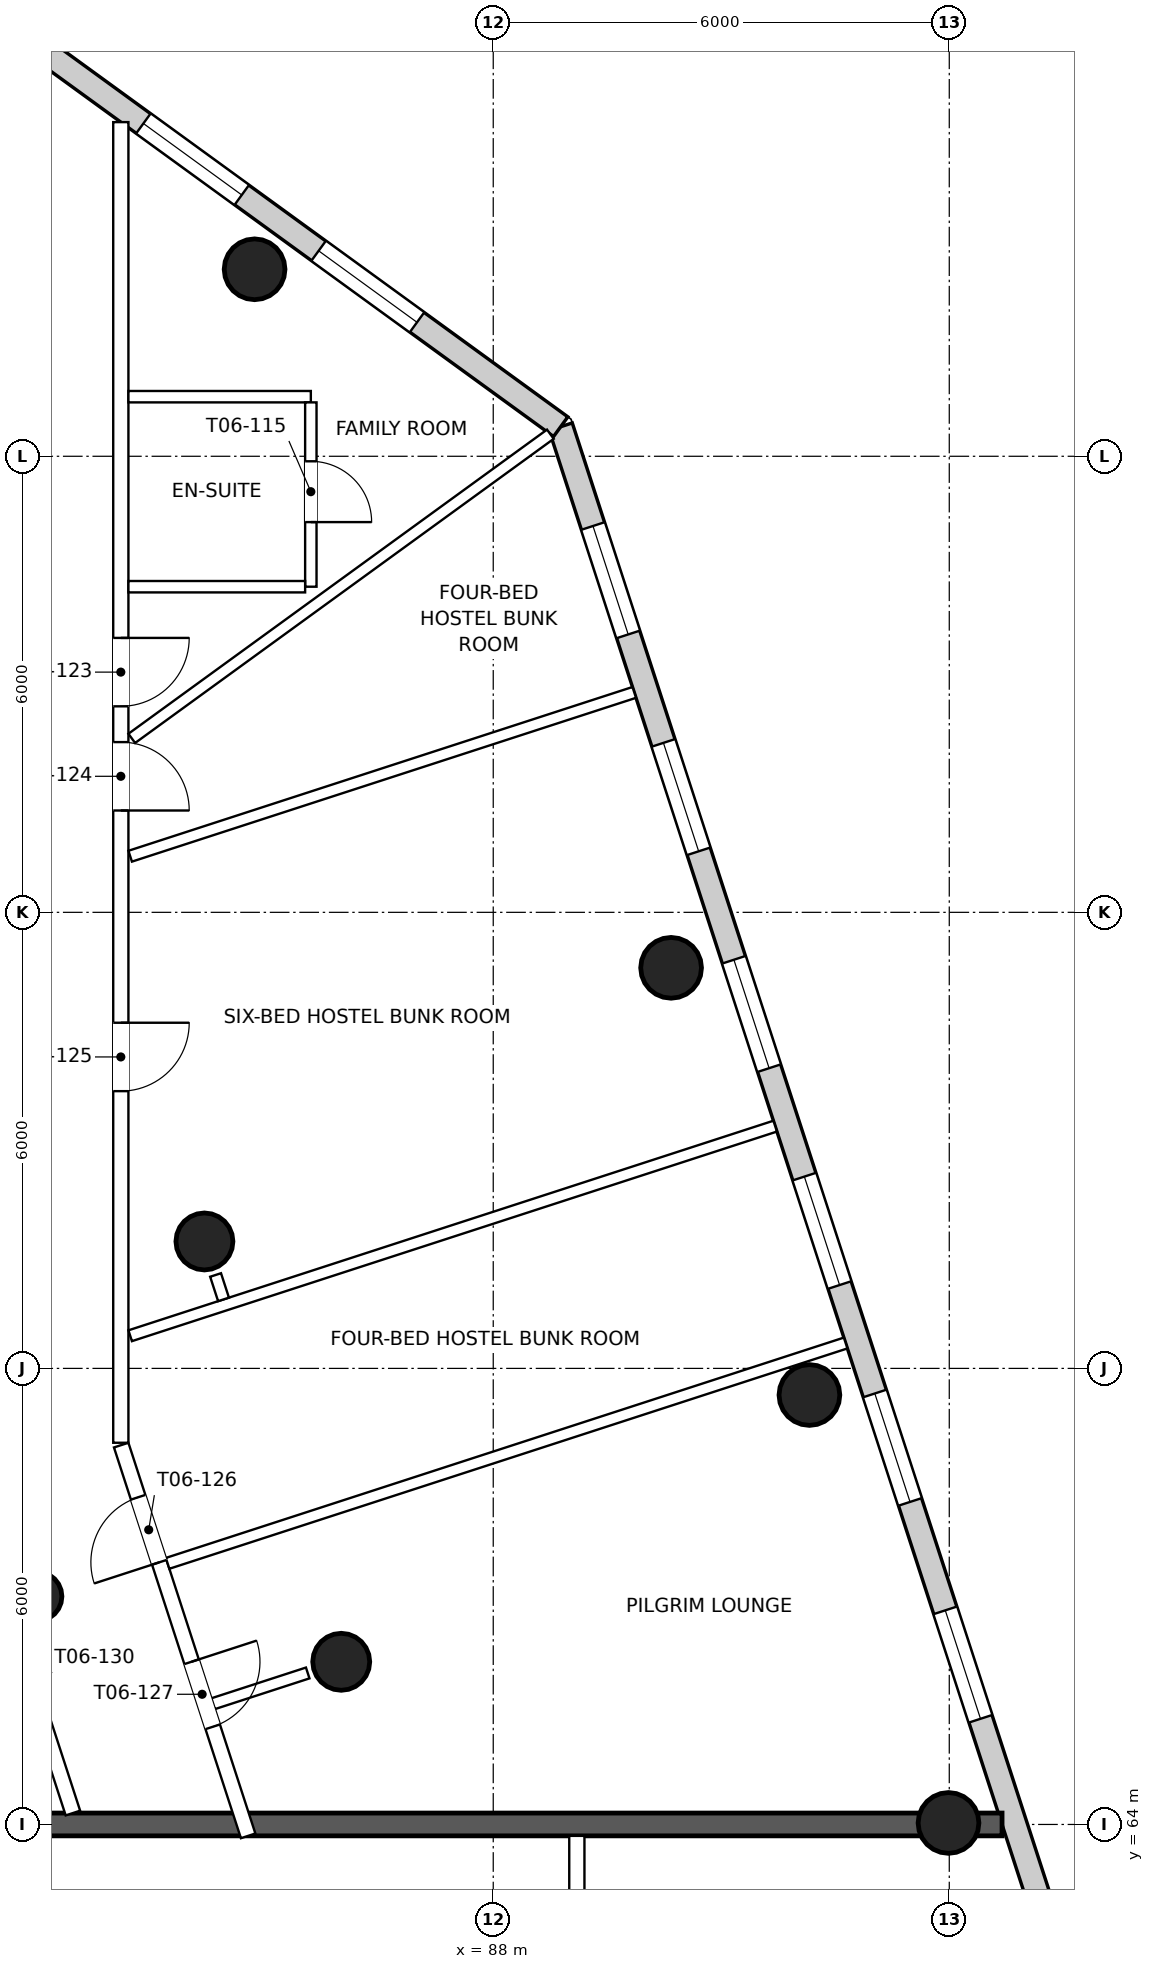
"""IFC4 building model, lengths in metres.
Left out: names, types, materials, properties, quantities, classifications, styles, units other than length and angle.
Written with IfcOpenShell. Run it as: python <this file> out.ifc"""

import sys

from ifc_helpers import new_model, si_unit, direction, frame, frame_2d, origin, origin_2d, place, context, subcontext, project, spatial, rectangle, circle, extrude, element, fill, save


model = new_model("IFC4")
c1 = context("Model", 3, precision=1e-05, world=origin(), true_north=direction((0.0, 1.0)))
c2 = subcontext(c1, "Body", "Model", "MODEL_VIEW")
j1 = project(units=[si_unit("LENGTHUNIT", "METRE"), si_unit("PLANEANGLEUNIT", "RADIAN")], contexts=[c1])
p1 = place(None, origin())
s1 = spatial("IfcSite", under=j1, at=p1, CompositionType="ELEMENT")
p2 = place(p1, origin())
s2 = spatial("IfcBuilding", under=s1, at=p2, CompositionType="ELEMENT")
p3 = place(p2, frame((0.0, 0.0, 98.6)))
s3 = spatial("IfcBuildingStorey", under=s2, at=p3, CompositionType="ELEMENT", Elevation=98.6)
for number, where, z_axis, x_axis in (
    (1, (93.99, 64.02, 0.0), (0.0, 0.0, 1.0), (1.0, 0.0, 0.0)),
    (2, (92.16, 69.65, 0.0), (0.0, 0.0, 1.0), (1.0, 0.0, 0.0)),
    (3, (90.34, 75.27, 0.0), (0.0, 0.0, 1.0), (1.0, 0.0, 0.0)),
    (4, (84.86, 84.46, 0.0), (0.0, 0.0, 1.0), (1.0, 0.0, 0.0)),
):
    element("IfcColumn", number, at=place(p3, frame(where, z_axis=z_axis, x_axis=x_axis)), inside=s3, PredefinedType="COLUMN", context=c2, shape_type="SweptSolid", body=[
        extrude(circle(Radius=0.4, at=origin_2d()), origin(), (0.0, 0.0, 1.0), 3.9),
    ])
for number, where, z_axis, x_axis in (
    (5, (86.0, 66.14, 0.0), (0.0, 0.0, 1.0), (1.0, 0.0, 0.0)),
    (6, (84.2, 71.67, 0.0), (0.0, 0.0, 1.0), (1.0, 0.0, 0.0)),
):
    element("IfcColumn", number, at=place(p3, frame(where, z_axis=z_axis, x_axis=x_axis)), inside=s3, PredefinedType="COLUMN", context=c2, shape_type="SweptSolid", body=[
        extrude(circle(Radius=0.375, at=origin_2d()), origin(), (0.0, 0.0, 1.0), 3.9),
    ])
p4 = place(p3, frame((82.0, 67.0, 0.0), z_axis=(0.0, 0.0, 1.0), x_axis=(1.0, 0.0, 0.0)))
e7 = element("IfcColumn", 7, at=p4, inside=s3, PredefinedType="COLUMN", context=c2, shape_type="SweptSolid", body=[
    extrude(circle(Radius=0.325, at=origin_2d()), origin(), (0.0, 0.0, 1.0), 3.9),
])
p5 = place(p3, frame((95.762, 61.231, 0.0), z_axis=(0.0, 0.0, 1.0), x_axis=(-0.309018577053, 0.95105600205, 0.0)))
e8 = element("IfcWall", 8, at=p5, inside=s3, PredefinedType="SOLIDWALL", context=c2, shape_type="SweptSolid", body=[
    extrude(rectangle(XDim=22.247, YDim=0.32, at=frame_2d((11.124, 0.0))), origin(), (0.0, 0.0, 1.0), 3.6),
])
p6 = place(p5, frame((4.374, 0.0, 0.9)))
e9 = element("IfcOpeningElement", 9, at=p6, cuts=e8, PredefinedType="OPENING", context=c2, shape_type="SweptSolid", body=[
    extrude(rectangle(XDim=1.5, YDim=1.8, at=frame_2d((0.75, 0.9))), frame((0.0, 0.17, 0.0), z_axis=(0.0, -1.0, 0.0), x_axis=(1.0, 0.0, 0.0)), (0.0, 0.0, 1.0), 0.34),
])
p7 = place(p5, frame((7.374, 0.0, 0.9)))
e10 = element("IfcOpeningElement", 10, at=p7, cuts=e8, PredefinedType="OPENING", context=c2, shape_type="SweptSolid", body=[
    extrude(rectangle(XDim=1.5, YDim=1.8, at=frame_2d((0.75, 0.9))), frame((0.0, 0.17, 0.0), z_axis=(0.0, -1.0, 0.0), x_axis=(1.0, 0.0, 0.0)), (0.0, 0.0, 1.0), 0.34),
])
p8 = place(p5, frame((10.374, 0.0, 0.9)))
e11 = element("IfcOpeningElement", 11, at=p8, cuts=e8, PredefinedType="OPENING", context=c2, shape_type="SweptSolid", body=[
    extrude(rectangle(XDim=1.5, YDim=1.8, at=frame_2d((0.75, 0.9))), frame((0.0, 0.17, 0.0), z_axis=(0.0, -1.0, 0.0), x_axis=(1.0, 0.0, 0.0)), (0.0, 0.0, 1.0), 0.34),
])
p9 = place(p5, frame((13.374, 0.0, 0.9)))
e12 = element("IfcOpeningElement", 12, at=p9, cuts=e8, PredefinedType="OPENING", context=c2, shape_type="SweptSolid", body=[
    extrude(rectangle(XDim=1.5, YDim=1.8, at=frame_2d((0.75, 0.9))), frame((0.0, 0.17, 0.0), z_axis=(0.0, -1.0, 0.0), x_axis=(1.0, 0.0, 0.0)), (0.0, 0.0, 1.0), 0.34),
])
p10 = place(p5, frame((16.374, 0.0, 0.9)))
e13 = element("IfcOpeningElement", 13, at=p10, cuts=e8, PredefinedType="OPENING", context=c2, shape_type="SweptSolid", body=[
    extrude(rectangle(XDim=1.5, YDim=1.8, at=frame_2d((0.75, 0.9))), frame((0.0, 0.17, 0.0), z_axis=(0.0, -1.0, 0.0), x_axis=(1.0, 0.0, 0.0)), (0.0, 0.0, 1.0), 0.34),
])
p11 = place(p5, frame((19.374, 0.0, 0.9)))
e14 = element("IfcOpeningElement", 14, at=p11, cuts=e8, PredefinedType="OPENING", context=c2, shape_type="SweptSolid", body=[
    extrude(rectangle(XDim=1.5, YDim=1.8, at=frame_2d((0.75, 0.9))), frame((0.0, 0.17, 0.0), z_axis=(0.0, -1.0, 0.0), x_axis=(1.0, 0.0, 0.0)), (0.0, 0.0, 1.0), 0.34),
])
p12 = place(p3, frame((88.888, 82.389, 0.0), z_axis=(0.0, 0.0, 1.0), x_axis=(-0.809009213142, 0.587795962092, 0.0)))
e15 = element("IfcWall", 15, at=p12, inside=s3, PredefinedType="SOLIDWALL", context=c2, shape_type="SweptSolid", body=[
    extrude(rectangle(XDim=9.274, YDim=0.32, at=frame_2d((4.637, 0.0))), origin(), (0.0, 0.0, 1.0), 3.6),
])
p13 = place(p12, frame((2.337, 0.0, 0.9)))
e16 = element("IfcOpeningElement", 16, at=p13, cuts=e15, PredefinedType="OPENING", context=c2, shape_type="SweptSolid", body=[
    extrude(rectangle(XDim=1.6, YDim=1.8, at=frame_2d((0.8, 0.9))), frame((0.0, 0.17, 0.0), z_axis=(0.0, -1.0, 0.0), x_axis=(1.0, 0.0, 0.0)), (0.0, 0.0, 1.0), 0.34),
])
p14 = place(p12, frame((5.187, 0.0, 0.9)))
e17 = element("IfcOpeningElement", 17, at=p14, cuts=e15, PredefinedType="OPENING", context=c2, shape_type="SweptSolid", body=[
    extrude(rectangle(XDim=1.6, YDim=1.8, at=frame_2d((0.8, 0.9))), frame((0.0, 0.17, 0.0), z_axis=(0.0, -1.0, 0.0), x_axis=(1.0, 0.0, 0.0)), (0.0, 0.0, 1.0), 0.34),
])
p15 = place(p3, frame((45.306, 64.0, 0.0), z_axis=(0.0, 0.0, 1.0), x_axis=(1.0, 0.0, 0.0)))
e18 = element("IfcWall", 18, at=p15, inside=s3, PredefinedType="PARTITIONING", context=c2, shape_type="SweptSolid", body=[
    extrude(rectangle(XDim=49.389, YDim=0.3, at=frame_2d((24.694, 0.0))), origin(), (0.0, 0.0, 1.0), 2.9),
])
p16 = place(p15, frame((16.331, 0.0, 0.0)))
e19 = element("IfcOpeningElement", 19, at=p16, cuts=e18, PredefinedType="OPENING", context=c2, shape_type="SweptSolid", body=[
    extrude(rectangle(XDim=2.0, YDim=2.1, at=frame_2d((1.0, 1.05))), frame((0.0, 0.16, 0.0), z_axis=(0.0, -1.0, 0.0), x_axis=(1.0, 0.0, 0.0)), (0.0, 0.0, 1.0), 0.32),
])
p17 = place(p15, frame((31.058, 0.0, 0.0)))
e20 = element("IfcOpeningElement", 20, at=p17, cuts=e18, PredefinedType="OPENING", context=c2, shape_type="SweptSolid", body=[
    extrude(rectangle(XDim=2.0, YDim=2.1, at=frame_2d((1.0, 1.05))), frame((0.0, 0.16, 0.0), z_axis=(0.0, -1.0, 0.0), x_axis=(1.0, 0.0, 0.0)), (0.0, 0.0, 1.0), 0.32),
])
p18 = place(p3, frame((83.1, 86.396, 0.0), z_axis=(0.0, 0.0, 1.0), x_axis=(0.0, -1.0, 0.0)))
e21 = element("IfcWall", 21, at=p18, inside=s3, PredefinedType="PARTITIONING", context=c2, shape_type="SweptSolid", body=[
    extrude(rectangle(XDim=17.375, YDim=0.2, at=frame_2d((8.687, 0.0))), origin(), (0.0, 0.0, 1.0), 3.0),
])
p19 = place(p18, frame((6.786, 0.0, 0.0)))
e22 = element("IfcOpeningElement", 22, at=p19, cuts=e21, PredefinedType="OPENING", context=c2, shape_type="SweptSolid", body=[
    extrude(rectangle(XDim=0.9, YDim=2.1, at=frame_2d((0.45, 1.05))), frame((0.0, 0.11, 0.0), z_axis=(0.0, -1.0, 0.0), x_axis=(1.0, 0.0, 0.0)), (0.0, 0.0, 1.0), 0.22),
])
p20 = place(p18, frame((8.156, 0.0, 0.0)))
e23 = element("IfcOpeningElement", 23, at=p20, cuts=e21, PredefinedType="OPENING", context=c2, shape_type="SweptSolid", body=[
    extrude(rectangle(XDim=0.9, YDim=2.1, at=frame_2d((0.45, 1.05))), frame((0.0, 0.11, 0.0), z_axis=(0.0, -1.0, 0.0), x_axis=(1.0, 0.0, 0.0)), (0.0, 0.0, 1.0), 0.22),
])
p21 = place(p18, frame((11.849, 0.0, 0.0)))
e24 = element("IfcOpeningElement", 24, at=p21, cuts=e21, PredefinedType="OPENING", context=c2, shape_type="SweptSolid", body=[
    extrude(rectangle(XDim=0.9, YDim=2.1, at=frame_2d((0.45, 1.05))), frame((0.0, 0.11, 0.0), z_axis=(0.0, -1.0, 0.0), x_axis=(1.0, 0.0, 0.0)), (0.0, 0.0, 1.0), 0.22),
])
p22 = place(p3, frame((83.105, 68.991, 0.0), z_axis=(0.0, 0.0, 1.0), x_axis=(0.309037048815, -0.951049999979, 0.0)))
e25 = element("IfcWall", 25, at=p22, inside=s3, PredefinedType="PARTITIONING", context=c2, shape_type="SweptSolid", body=[
    extrude(rectangle(XDim=5.405, YDim=0.2, at=frame_2d((2.703, 0.0))), origin(), (0.0, 0.0, 1.0), 3.6),
])
p23 = place(p22, frame((0.721, 0.0, 0.0)))
e26 = element("IfcOpeningElement", 26, at=p23, cuts=e25, PredefinedType="OPENING", context=c2, shape_type="SweptSolid", body=[
    extrude(rectangle(XDim=0.9, YDim=2.1, at=frame_2d((0.45, 1.05))), frame((0.0, 0.11, 0.0), z_axis=(0.0, -1.0, 0.0), x_axis=(1.0, 0.0, 0.0)), (0.0, 0.0, 1.0), 0.22),
])
p24 = place(p22, frame((2.997, 0.0, 0.0)))
e27 = element("IfcOpeningElement", 27, at=p24, cuts=e25, PredefinedType="OPENING", context=c2, shape_type="SweptSolid", body=[
    extrude(rectangle(XDim=0.9, YDim=2.1, at=frame_2d((0.45, 1.05))), frame((0.0, 0.11, 0.0), z_axis=(0.0, -1.0, 0.0), x_axis=(1.0, 0.0, 0.0)), (0.0, 0.0, 1.0), 0.22),
])
p25 = place(p3, frame((89.1, 63.85, 0.0), z_axis=(0.0, 0.0, 1.0), x_axis=(0.0, -1.0, 0.0)))
e28 = element("IfcWall", 28, at=p25, inside=s3, PredefinedType="PARTITIONING", context=c2, shape_type="SweptSolid", body=[
    extrude(rectangle(XDim=7.95, YDim=0.2, at=frame_2d((3.975, 0.0))), origin(), (0.0, 0.0, 1.0), 3.6),
])
p26 = place(p25, frame((4.885, 0.0, 0.0)))
e29 = element("IfcOpeningElement", 29, at=p26, cuts=e28, PredefinedType="OPENING", context=c2, shape_type="SweptSolid", body=[
    extrude(rectangle(XDim=0.9, YDim=2.1, at=frame_2d((0.45, 1.05))), frame((0.0, 0.11, 0.0), z_axis=(0.0, -1.0, 0.0), x_axis=(1.0, 0.0, 0.0)), (0.0, 0.0, 1.0), 0.22),
])
p27 = place(p25, frame((0.822, 0.0, 0.0)))
e30 = element("IfcOpeningElement", 30, at=p27, cuts=e28, PredefinedType="OPENING", context=c2, shape_type="SweptSolid", body=[
    extrude(rectangle(XDim=0.9, YDim=2.1, at=frame_2d((0.45, 1.05))), frame((0.0, 0.11, 0.0), z_axis=(0.0, -1.0, 0.0), x_axis=(1.0, 0.0, 0.0)), (0.0, 0.0, 1.0), 0.22),
])
p28 = place(p3, frame((82.47, 64.15, 0.0), z_axis=(0.0, 0.0, 1.0), x_axis=(-0.309031112369, 0.951051928965, 0.0)))
e31 = element("IfcWall", 31, at=p28, inside=s3, PredefinedType="PARTITIONING", context=c2, shape_type="SweptSolid", body=[
    extrude(rectangle(XDim=4.922, YDim=0.2, at=frame_2d((2.461, 0.0))), origin(), (0.0, 0.0, 1.0), 3.6),
])
p29 = place(p28, frame((1.368, 0.0, 0.0)))
e32 = element("IfcOpeningElement", 32, at=p29, cuts=e31, PredefinedType="OPENING", context=c2, shape_type="SweptSolid", body=[
    extrude(rectangle(XDim=0.9, YDim=2.1, at=frame_2d((0.45, 1.05))), frame((0.0, 0.11, 0.0), z_axis=(0.0, -1.0, 0.0), x_axis=(1.0, 0.0, 0.0)), (0.0, 0.0, 1.0), 0.22),
])
p30 = place(p3, frame((88.752, 82.29, 0.0), z_axis=(0.0, 0.0, 1.0), x_axis=(-0.809035290939, -0.587760068408, 0.0)))
e33 = element("IfcWall", 33, at=p30, inside=s3, PredefinedType="PARTITIONING", context=c2, shape_type="SweptSolid", body=[
    extrude(rectangle(XDim=6.808, YDim=0.15, at=frame_2d((3.404, 0.0))), origin(), (0.0, 0.0, 1.0), 2.9),
])
p31 = place(p3, frame((92.636, 70.334, 0.0), z_axis=(0.0, 0.0, 1.0), x_axis=(-0.951060843481, -0.309003676349, 0.0)))
e34 = element("IfcWall", 34, at=p31, inside=s3, PredefinedType="PARTITIONING", context=c2, shape_type="SweptSolid", body=[
    extrude(rectangle(XDim=9.38, YDim=0.15, at=frame_2d((4.69, 0.0))), origin(), (0.0, 0.0, 1.0), 3.0),
])
p32 = place(p3, frame((91.709, 73.187, 0.0), z_axis=(0.0, 0.0, 1.0), x_axis=(-0.951058193987, -0.309011830923, 0.0)))
e35 = element("IfcWall", 35, at=p32, inside=s3, PredefinedType="PARTITIONING", context=c2, shape_type="SweptSolid", body=[
    extrude(rectangle(XDim=8.923, YDim=0.15, at=frame_2d((4.461, 0.0))), origin(), (0.0, 0.0, 1.0), 3.0),
])
p33 = place(p3, frame((89.855, 78.893, 0.0), z_axis=(0.0, 0.0, 1.0), x_axis=(-0.951050790673, -0.309034615471, 0.0)))
e36 = element("IfcWall", 36, at=p33, inside=s3, PredefinedType="PARTITIONING", context=c2, shape_type="SweptSolid", body=[
    extrude(rectangle(XDim=6.973, YDim=0.15, at=frame_2d((3.487, 0.0))), origin(), (0.0, 0.0, 1.0), 2.9),
])
p34 = place(p3, frame((83.2, 82.784, 0.0), z_axis=(0.0, 0.0, 1.0), x_axis=(1.0, 0.0, 0.0)))
e37 = element("IfcWall", 37, at=p34, inside=s3, PredefinedType="PARTITIONING", context=c2, shape_type="SweptSolid", body=[
    extrude(rectangle(XDim=2.4, YDim=0.15, at=frame_2d((1.2, 0.0))), origin(), (0.0, 0.0, 1.0), 3.6),
])
p35 = place(p3, frame((85.6, 80.284, 0.0), z_axis=(0.0, 0.0, 1.0), x_axis=(0.0, 1.0, 0.0)))
e38 = element("IfcWall", 38, at=p35, inside=s3, PredefinedType="PARTITIONING", context=c2, shape_type="SweptSolid", body=[
    extrude(rectangle(XDim=2.425, YDim=0.15, at=frame_2d((1.212, 0.0))), origin(), (0.0, 0.0, 1.0), 3.6),
])
p36 = place(p35, frame((0.85, 0.0, 0.0)))
e39 = element("IfcOpeningElement", 39, at=p36, cuts=e38, PredefinedType="OPENING", context=c2, shape_type="SweptSolid", body=[
    extrude(rectangle(XDim=0.8, YDim=2.1, at=frame_2d((0.4, 1.05))), frame((0.0, 0.085, 0.0), z_axis=(0.0, -1.0, 0.0), x_axis=(1.0, 0.0, 0.0)), (0.0, 0.0, 1.0), 0.17),
])
p37 = place(p3, frame((83.2, 80.284, 0.0), z_axis=(0.0, 0.0, 1.0), x_axis=(1.0, 0.0, 0.0)))
e40 = element("IfcWall", 40, at=p37, inside=s3, PredefinedType="PARTITIONING", context=c2, shape_type="SweptSolid", body=[
    extrude(rectangle(XDim=2.325, YDim=0.15, at=frame_2d((1.163, 0.0))), origin(), (0.0, 0.0, 1.0), 3.6),
])
p38 = place(p3, frame((85.559, 65.993, 0.0), z_axis=(0.0, 0.0, 1.0), x_axis=(-0.951046418515, -0.309048070419, 0.0)))
e41 = element("IfcWall", 41, at=p38, inside=s3, PredefinedType="PARTITIONING", context=c2, shape_type="SweptSolid", body=[
    extrude(rectangle(XDim=1.307, YDim=0.15, at=frame_2d((0.654, 0.0))), origin(), (0.0, 0.0, 1.0), 3.6),
])
p39 = place(p3, frame((84.347, 71.229, 0.0), z_axis=(0.0, 0.0, 1.0), x_axis=(0.309282141787, -0.950970323812, 0.0)))
e42 = element("IfcWall", 42, at=p39, inside=s3, PredefinedType="PARTITIONING", context=c2, shape_type="SweptSolid", body=[
    extrude(rectangle(XDim=0.338, YDim=0.15, at=frame_2d((0.169, 0.0))), origin(), (0.0, 0.0, 1.0), 3.0),
])
p40 = place(p6, origin())
e43 = element("IfcWindow", 43, at=p40, inside=s3, PartitioningType="SINGLE_PANEL", PredefinedType="WINDOW", context=c2, shape_type="SweptSolid", body=[
    extrude(rectangle(XDim=1.5, YDim=1.8, at=frame_2d((0.75, 0.9))), frame((0.0, 0.07, 0.0), z_axis=(0.0, -1.0, 0.0), x_axis=(1.0, 0.0, 0.0)), (0.0, 0.0, 1.0), 0.06),
])
fill(e9, e43)
p41 = place(p7, origin())
e44 = element("IfcWindow", 44, at=p41, inside=s3, PartitioningType="SINGLE_PANEL", PredefinedType="WINDOW", context=c2, shape_type="SweptSolid", body=[
    extrude(rectangle(XDim=1.5, YDim=1.8, at=frame_2d((0.75, 0.9))), frame((0.0, 0.07, 0.0), z_axis=(0.0, -1.0, 0.0), x_axis=(1.0, 0.0, 0.0)), (0.0, 0.0, 1.0), 0.06),
])
fill(e10, e44)
p42 = place(p8, origin())
e45 = element("IfcWindow", 45, at=p42, inside=s3, PartitioningType="SINGLE_PANEL", PredefinedType="WINDOW", context=c2, shape_type="SweptSolid", body=[
    extrude(rectangle(XDim=1.5, YDim=1.8, at=frame_2d((0.75, 0.9))), frame((0.0, 0.07, 0.0), z_axis=(0.0, -1.0, 0.0), x_axis=(1.0, 0.0, 0.0)), (0.0, 0.0, 1.0), 0.06),
])
fill(e11, e45)
p43 = place(p9, origin())
e46 = element("IfcWindow", 46, at=p43, inside=s3, PartitioningType="SINGLE_PANEL", PredefinedType="WINDOW", context=c2, shape_type="SweptSolid", body=[
    extrude(rectangle(XDim=1.5, YDim=1.8, at=frame_2d((0.75, 0.9))), frame((0.0, 0.07, 0.0), z_axis=(0.0, -1.0, 0.0), x_axis=(1.0, 0.0, 0.0)), (0.0, 0.0, 1.0), 0.06),
])
fill(e12, e46)
p44 = place(p10, origin())
e47 = element("IfcWindow", 47, at=p44, inside=s3, PartitioningType="SINGLE_PANEL", PredefinedType="WINDOW", context=c2, shape_type="SweptSolid", body=[
    extrude(rectangle(XDim=1.5, YDim=1.8, at=frame_2d((0.75, 0.9))), frame((0.0, 0.07, 0.0), z_axis=(0.0, -1.0, 0.0), x_axis=(1.0, 0.0, 0.0)), (0.0, 0.0, 1.0), 0.06),
])
fill(e13, e47)
p45 = place(p11, origin())
e48 = element("IfcWindow", 48, at=p45, inside=s3, PartitioningType="SINGLE_PANEL", PredefinedType="WINDOW", context=c2, shape_type="SweptSolid", body=[
    extrude(rectangle(XDim=1.5, YDim=1.8, at=frame_2d((0.75, 0.9))), frame((0.0, 0.07, 0.0), z_axis=(0.0, -1.0, 0.0), x_axis=(1.0, 0.0, 0.0)), (0.0, 0.0, 1.0), 0.06),
])
fill(e14, e48)
p46 = place(p13, origin())
e49 = element("IfcWindow", 49, at=p46, inside=s3, PartitioningType="SINGLE_PANEL", PredefinedType="WINDOW", context=c2, shape_type="SweptSolid", body=[
    extrude(rectangle(XDim=1.6, YDim=1.8, at=frame_2d((0.8, 0.9))), frame((0.0, 0.07, 0.0), z_axis=(0.0, -1.0, 0.0), x_axis=(1.0, 0.0, 0.0)), (0.0, 0.0, 1.0), 0.06),
])
fill(e16, e49)
p47 = place(p14, origin())
e50 = element("IfcWindow", 50, at=p47, inside=s3, PartitioningType="SINGLE_PANEL", PredefinedType="WINDOW", context=c2, shape_type="SweptSolid", body=[
    extrude(rectangle(XDim=1.6, YDim=1.8, at=frame_2d((0.8, 0.9))), frame((0.0, 0.07, 0.0), z_axis=(0.0, -1.0, 0.0), x_axis=(1.0, 0.0, 0.0)), (0.0, 0.0, 1.0), 0.06),
])
fill(e17, e50)
p48 = place(p36, frame((0.8, 0.0, 0.0), z_axis=(0.0, 0.0, 1.0), x_axis=(-1.0, 0.0, 0.0)))
e51 = element("IfcDoor", 51, at=p48, inside=s3, OperationType="SINGLE_SWING_RIGHT", PredefinedType="DOOR", context=c2, shape_type="SweptSolid", body=[
    extrude(rectangle(XDim=0.8, YDim=2.1, at=frame_2d((0.4, 1.05))), frame((0.0, 0.025, 0.0), z_axis=(0.0, -1.0, 0.0), x_axis=(1.0, 0.0, 0.0)), (0.0, 0.0, 1.0), 0.05),
])
fill(e39, e51)
p49 = place(p19, origin())
e52 = element("IfcDoor", 52, at=p49, inside=s3, OperationType="SINGLE_SWING_LEFT", PredefinedType="DOOR", context=c2, shape_type="SweptSolid", body=[
    extrude(rectangle(XDim=0.9, YDim=2.1, at=frame_2d((0.45, 1.05))), frame((0.0, 0.025, 0.0), z_axis=(0.0, -1.0, 0.0), x_axis=(1.0, 0.0, 0.0)), (0.0, 0.0, 1.0), 0.05),
])
fill(e22, e52)
p50 = place(p20, origin())
e53 = element("IfcDoor", 53, at=p50, inside=s3, OperationType="SINGLE_SWING_RIGHT", PredefinedType="DOOR", context=c2, shape_type="SweptSolid", body=[
    extrude(rectangle(XDim=0.9, YDim=2.1, at=frame_2d((0.45, 1.05))), frame((0.0, 0.025, 0.0), z_axis=(0.0, -1.0, 0.0), x_axis=(1.0, 0.0, 0.0)), (0.0, 0.0, 1.0), 0.05),
])
fill(e23, e53)
p51 = place(p21, origin())
e54 = element("IfcDoor", 54, at=p51, inside=s3, OperationType="SINGLE_SWING_LEFT", PredefinedType="DOOR", context=c2, shape_type="SweptSolid", body=[
    extrude(rectangle(XDim=0.9, YDim=2.1, at=frame_2d((0.45, 1.05))), frame((0.0, 0.025, 0.0), z_axis=(0.0, -1.0, 0.0), x_axis=(1.0, 0.0, 0.0)), (0.0, 0.0, 1.0), 0.05),
])
fill(e24, e54)
p52 = place(p23, frame((0.9, 0.0, 0.0), z_axis=(0.0, 0.0, 1.0), x_axis=(-1.0, 0.0, 0.0)))
e55 = element("IfcDoor", 55, at=p52, inside=s3, OperationType="SINGLE_SWING_LEFT", PredefinedType="DOOR", context=c2, shape_type="SweptSolid", body=[
    extrude(rectangle(XDim=0.9, YDim=2.1, at=frame_2d((0.45, 1.05))), frame((0.0, 0.025, 0.0), z_axis=(0.0, -1.0, 0.0), x_axis=(1.0, 0.0, 0.0)), (0.0, 0.0, 1.0), 0.05),
])
fill(e26, e55)
p53 = place(p24, origin())
e56 = element("IfcDoor", 56, at=p53, inside=s3, OperationType="SINGLE_SWING_LEFT", PredefinedType="DOOR", context=c2, shape_type="SweptSolid", body=[
    extrude(rectangle(XDim=0.9, YDim=2.1, at=frame_2d((0.45, 1.05))), frame((0.0, 0.025, 0.0), z_axis=(0.0, -1.0, 0.0), x_axis=(1.0, 0.0, 0.0)), (0.0, 0.0, 1.0), 0.05),
])
fill(e27, e56)
save(model, sys.argv[1])
